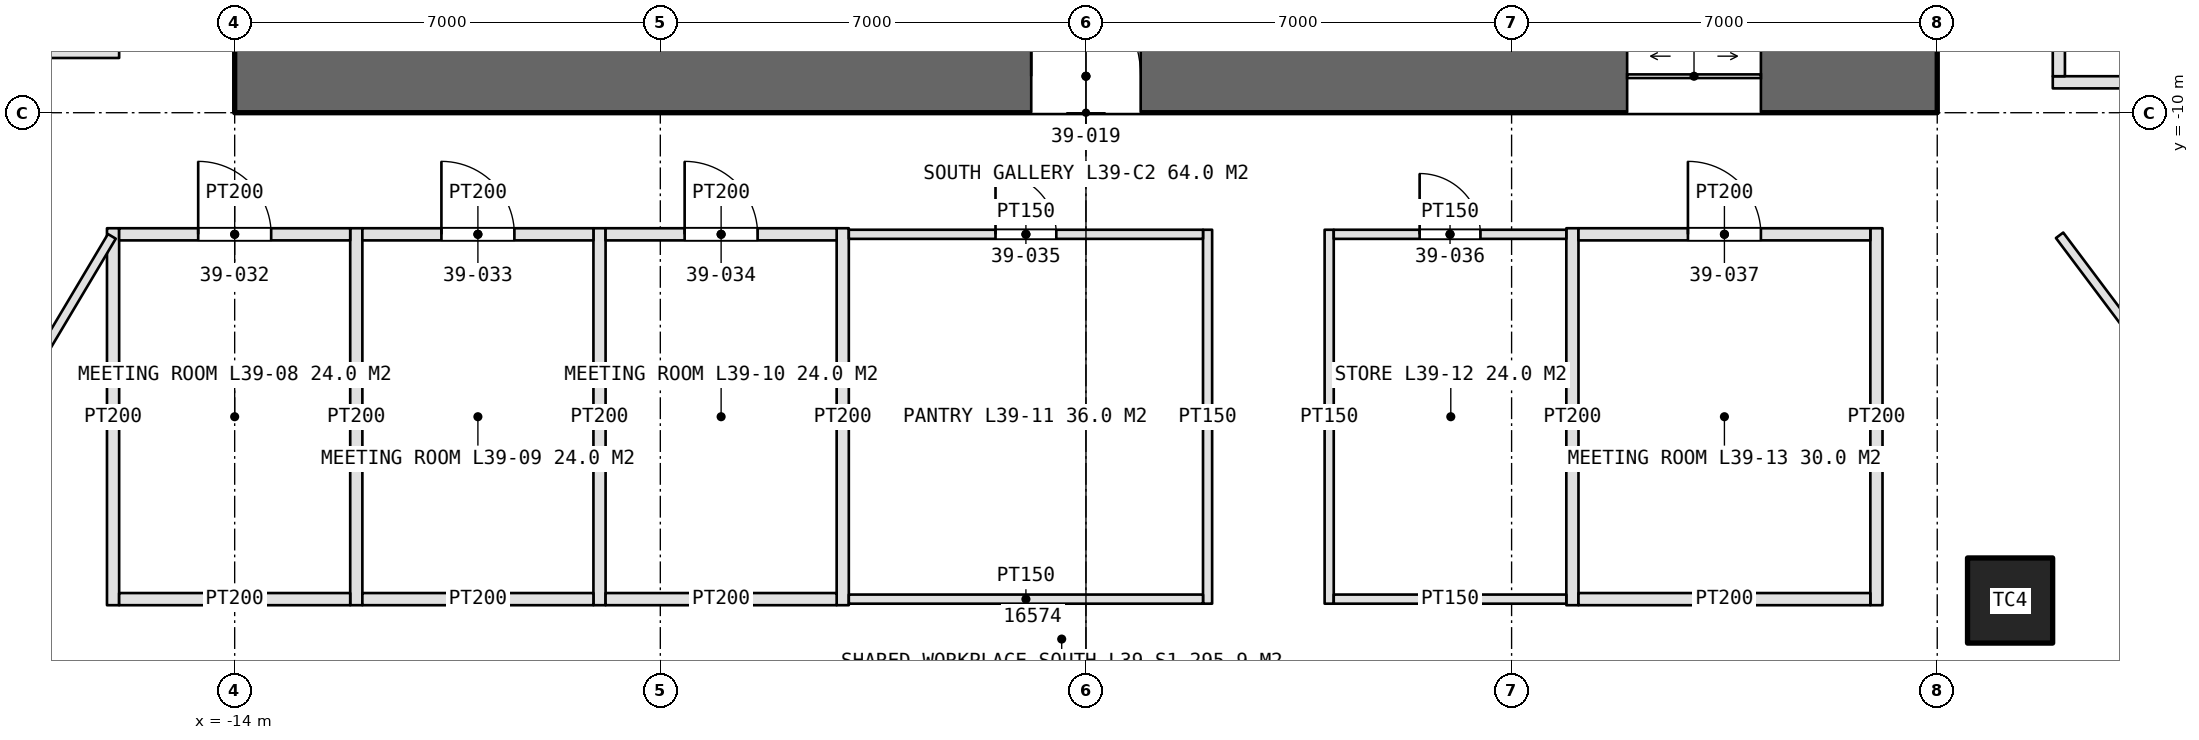
"""IFC4 building model, lengths in metres.
Left out: names, types, materials, properties, quantities, classifications, styles, units other than length and angle.
Written with IfcOpenShell. Run it as: python <this file> out.ifc"""

import sys

from ifc_helpers import new_model, si_unit, direction, frame, frame_2d, origin, origin_2d, place, context, subcontext, project, spatial, rectangle, extrude, element, fill, save


model = new_model("IFC4")
c1 = context("Model", 3, precision=1e-05, world=origin(), true_north=direction((0.0, 1.0)))
c2 = subcontext(c1, "Body", "Model", "MODEL_VIEW")
j1 = project(units=[si_unit("LENGTHUNIT", "METRE"), si_unit("PLANEANGLEUNIT", "RADIAN")], contexts=[c1])
p1 = place(None, origin())
s1 = spatial("IfcSite", under=j1, at=p1, CompositionType="ELEMENT")
p2 = place(p1, origin())
s2 = spatial("IfcBuilding", under=s1, at=p2, CompositionType="ELEMENT")
p3 = place(p2, frame((0.0, 0.0, 180.6)))
s3 = spatial("IfcBuildingStorey", under=s2, at=p3, CompositionType="ELEMENT", Elevation=180.6)
p4 = place(p3, frame((-14.0, -9.4, 0.0), z_axis=(0.0, 0.0, 1.0), x_axis=(1.0, 0.0, 0.0)))
e1 = element("IfcWall", 1, at=p4, inside=s3, PredefinedType="SHEAR", context=c2, shape_type="SweptSolid", body=[
    extrude(rectangle(XDim=28.0, YDim=1.2, at=frame_2d((14.0, 0.0))), origin(), (0.0, 0.0, 1.0), 4.2),
])
p5 = place(p4, frame((13.1, 0.0, 0.0)))
e2 = element("IfcOpeningElement", 2, at=p5, cuts=e1, PredefinedType="OPENING", context=c2, shape_type="SweptSolid", body=[
    extrude(rectangle(XDim=1.8, YDim=2.4, at=frame_2d((0.9, 1.2))), frame((0.0, 0.61, 0.0), z_axis=(0.0, -1.0, 0.0), x_axis=(1.0, 0.0, 0.0)), (0.0, 0.0, 1.0), 1.22),
])
p6 = place(p4, frame((22.9, 0.0, 0.0)))
e3 = element("IfcOpeningElement", 3, at=p6, cuts=e1, PredefinedType="OPENING", context=c2, shape_type="SweptSolid", body=[
    extrude(rectangle(XDim=2.2, YDim=2.7, at=frame_2d((1.1, 1.35))), frame((0.0, 0.61, 0.0), z_axis=(0.0, -1.0, 0.0), x_axis=(1.0, 0.0, 0.0)), (0.0, 0.0, 1.0), 1.22),
])
p7 = place(p3, frame((15.198, -18.023, 0.0), z_axis=(0.0, 0.0, 1.0), x_axis=(1.0, 0.0, 0.0)))
e4 = element("IfcColumn", 4, at=p7, inside=s3, PredefinedType="COLUMN", context=c2, shape_type="SweptSolid", body=[
    extrude(rectangle(XDim=1.4, YDim=1.4, at=origin_2d()), origin(), (0.0, 0.0, 1.0), 4.2),
])
p8 = place(p3, frame((15.9, -9.5, 0.0), z_axis=(0.0, 0.0, 1.0), x_axis=(1.0, 0.0, 0.0)))
e5 = element("IfcWall", 5, at=p8, inside=s3, PredefinedType="PARTITIONING", context=c2, shape_type="SweptSolid", body=[
    extrude(rectangle(XDim=7.2, YDim=0.2, at=frame_2d((3.6, 0.0))), origin(), (0.0, 0.0, 1.0), 3.0),
])
p9 = place(p3, frame((16.0, -9.4, 0.0), z_axis=(0.0, 0.0, 1.0), x_axis=(0.0, 1.0, 0.0)))
e6 = element("IfcWall", 6, at=p9, inside=s3, PredefinedType="PARTITIONING", context=c2, shape_type="SweptSolid", body=[
    extrude(rectangle(XDim=5.8, YDim=0.2, at=frame_2d((2.9, 0.0))), origin(), (0.0, 0.0, 1.0), 3.0),
])
p10 = place(p9, frame((2.3, 0.0, 0.0)))
e7 = element("IfcOpeningElement", 7, at=p10, cuts=e6, PredefinedType="OPENING", context=c2, shape_type="SweptSolid", body=[
    extrude(rectangle(XDim=1.2, YDim=2.4, at=frame_2d((0.6, 1.2))), frame((0.0, 0.11, 0.0), z_axis=(0.0, -1.0, 0.0), x_axis=(1.0, 0.0, 0.0)), (0.0, 0.0, 1.0), 0.22),
])
for number, where, z_axis, x_axis in (
    (8, (-16.0, -11.9, 0.0), (0.0, 0.0, 1.0), (0.0, -1.0, 0.0)),
    (9, (-12.0, -11.9, 0.0), (0.0, 0.0, 1.0), (0.0, -1.0, 0.0)),
    (10, (-8.0, -11.9, 0.0), (0.0, 0.0, 1.0), (0.0, -1.0, 0.0)),
    (11, (-4.0, -11.9, 0.0), (0.0, 0.0, 1.0), (0.0, -1.0, 0.0)),
):
    element("IfcWall", number, at=place(p3, frame(where, z_axis=z_axis, x_axis=x_axis)), inside=s3, PredefinedType="PARTITIONING", context=c2, shape_type="SweptSolid", body=[
        extrude(rectangle(XDim=6.2, YDim=0.2, at=frame_2d((3.1, 0.0))), origin(), (0.0, 0.0, 1.0), 3.0),
    ])
p11 = place(p3, frame((2.0, -11.925, 0.0), z_axis=(0.0, 0.0, 1.0), x_axis=(0.0, -1.0, 0.0)))
e12 = element("IfcWall", 12, at=p11, inside=s3, PredefinedType="PARTITIONING", context=c2, shape_type="SweptSolid", body=[
    extrude(rectangle(XDim=6.15, YDim=0.15, at=frame_2d((3.075, 0.0))), origin(), (0.0, 0.0, 1.0), 3.0),
])
p12 = place(p3, frame((-15.9, -12.0, 0.0), z_axis=(0.0, 0.0, 1.0), x_axis=(1.0, 0.0, 0.0)))
e13 = element("IfcWall", 13, at=p12, inside=s3, PredefinedType="PARTITIONING", context=c2, shape_type="SweptSolid", body=[
    extrude(rectangle(XDim=3.8, YDim=0.2, at=frame_2d((1.9, 0.0))), origin(), (0.0, 0.0, 1.0), 3.0),
])
p13 = place(p12, frame((1.3, 0.0, 0.0)))
e14 = element("IfcOpeningElement", 14, at=p13, cuts=e13, PredefinedType="OPENING", context=c2, shape_type="SweptSolid", body=[
    extrude(rectangle(XDim=1.2, YDim=2.4, at=frame_2d((0.6, 1.2))), frame((0.0, 0.11, 0.0), z_axis=(0.0, -1.0, 0.0), x_axis=(1.0, 0.0, 0.0)), (0.0, 0.0, 1.0), 0.22),
])
p14 = place(p3, frame((-15.9, -18.0, 0.0), z_axis=(0.0, 0.0, 1.0), x_axis=(1.0, 0.0, 0.0)))
e15 = element("IfcWall", 15, at=p14, inside=s3, PredefinedType="PARTITIONING", context=c2, shape_type="SweptSolid", body=[
    extrude(rectangle(XDim=3.8, YDim=0.2, at=frame_2d((1.9, 0.0))), origin(), (0.0, 0.0, 1.0), 3.0),
])
p15 = place(p3, frame((-11.9, -12.0, 0.0), z_axis=(0.0, 0.0, 1.0), x_axis=(1.0, 0.0, 0.0)))
e16 = element("IfcWall", 16, at=p15, inside=s3, PredefinedType="PARTITIONING", context=c2, shape_type="SweptSolid", body=[
    extrude(rectangle(XDim=3.8, YDim=0.2, at=frame_2d((1.9, 0.0))), origin(), (0.0, 0.0, 1.0), 3.0),
])
p16 = place(p15, frame((1.3, 0.0, 0.0)))
e17 = element("IfcOpeningElement", 17, at=p16, cuts=e16, PredefinedType="OPENING", context=c2, shape_type="SweptSolid", body=[
    extrude(rectangle(XDim=1.2, YDim=2.4, at=frame_2d((0.6, 1.2))), frame((0.0, 0.11, 0.0), z_axis=(0.0, -1.0, 0.0), x_axis=(1.0, 0.0, 0.0)), (0.0, 0.0, 1.0), 0.22),
])
p17 = place(p3, frame((-11.9, -18.0, 0.0), z_axis=(0.0, 0.0, 1.0), x_axis=(1.0, 0.0, 0.0)))
e18 = element("IfcWall", 18, at=p17, inside=s3, PredefinedType="PARTITIONING", context=c2, shape_type="SweptSolid", body=[
    extrude(rectangle(XDim=3.8, YDim=0.2, at=frame_2d((1.9, 0.0))), origin(), (0.0, 0.0, 1.0), 3.0),
])
p18 = place(p3, frame((-7.9, -12.0, 0.0), z_axis=(0.0, 0.0, 1.0), x_axis=(1.0, 0.0, 0.0)))
e19 = element("IfcWall", 19, at=p18, inside=s3, PredefinedType="PARTITIONING", context=c2, shape_type="SweptSolid", body=[
    extrude(rectangle(XDim=3.8, YDim=0.2, at=frame_2d((1.9, 0.0))), origin(), (0.0, 0.0, 1.0), 3.0),
])
p19 = place(p18, frame((1.3, 0.0, 0.0)))
e20 = element("IfcOpeningElement", 20, at=p19, cuts=e19, PredefinedType="OPENING", context=c2, shape_type="SweptSolid", body=[
    extrude(rectangle(XDim=1.2, YDim=2.4, at=frame_2d((0.6, 1.2))), frame((0.0, 0.11, 0.0), z_axis=(0.0, -1.0, 0.0), x_axis=(1.0, 0.0, 0.0)), (0.0, 0.0, 1.0), 0.22),
])
p20 = place(p3, frame((-7.9, -18.0, 0.0), z_axis=(0.0, 0.0, 1.0), x_axis=(1.0, 0.0, 0.0)))
e21 = element("IfcWall", 21, at=p20, inside=s3, PredefinedType="PARTITIONING", context=c2, shape_type="SweptSolid", body=[
    extrude(rectangle(XDim=3.8, YDim=0.2, at=frame_2d((1.9, 0.0))), origin(), (0.0, 0.0, 1.0), 3.0),
])
p21 = place(p3, frame((-3.9, -12.0, 0.0), z_axis=(0.0, 0.0, 1.0), x_axis=(1.0, 0.0, 0.0)))
e22 = element("IfcWall", 22, at=p21, inside=s3, PredefinedType="PARTITIONING", context=c2, shape_type="SweptSolid", body=[
    extrude(rectangle(XDim=5.825, YDim=0.15, at=frame_2d((2.913, 0.0))), origin(), (0.0, 0.0, 1.0), 3.0),
])
p22 = place(p21, frame((2.413, 0.0, 0.0)))
e23 = element("IfcOpeningElement", 23, at=p22, cuts=e22, PredefinedType="OPENING", context=c2, shape_type="SweptSolid", body=[
    extrude(rectangle(XDim=1.0, YDim=2.2, at=frame_2d((0.5, 1.1))), frame((0.0, 0.085, 0.0), z_axis=(0.0, -1.0, 0.0), x_axis=(1.0, 0.0, 0.0)), (0.0, 0.0, 1.0), 0.17),
])
p23 = place(p3, frame((-3.9, -18.0, 0.0), z_axis=(0.0, 0.0, 1.0), x_axis=(1.0, 0.0, 0.0)))
e24 = element("IfcWall", 24, at=p23, inside=s3, PredefinedType="PARTITIONING", context=c2, shape_type="SweptSolid", body=[
    extrude(rectangle(XDim=5.825, YDim=0.15, at=frame_2d((2.913, 0.0))), origin(), (0.0, 0.0, 1.0), 3.0),
])
p24 = place(p3, frame((4.0, -11.925, 0.0), z_axis=(0.0, 0.0, 1.0), x_axis=(0.0, -1.0, 0.0)))
e25 = element("IfcWall", 25, at=p24, inside=s3, PredefinedType="PARTITIONING", context=c2, shape_type="SweptSolid", body=[
    extrude(rectangle(XDim=6.15, YDim=0.15, at=frame_2d((3.075, 0.0))), origin(), (0.0, 0.0, 1.0), 3.0),
])
for number, where, z_axis, x_axis in (
    (26, (8.0, -11.9, 0.0), (0.0, 0.0, 1.0), (0.0, -1.0, 0.0)),
    (27, (13.0, -11.9, 0.0), (0.0, 0.0, 1.0), (0.0, -1.0, 0.0)),
):
    element("IfcWall", number, at=place(p3, frame(where, z_axis=z_axis, x_axis=x_axis)), inside=s3, PredefinedType="PARTITIONING", context=c2, shape_type="SweptSolid", body=[
        extrude(rectangle(XDim=6.2, YDim=0.2, at=frame_2d((3.1, 0.0))), origin(), (0.0, 0.0, 1.0), 3.0),
    ])
p25 = place(p3, frame((4.075, -12.0, 0.0), z_axis=(0.0, 0.0, 1.0), x_axis=(1.0, 0.0, 0.0)))
e28 = element("IfcWall", 28, at=p25, inside=s3, PredefinedType="PARTITIONING", context=c2, shape_type="SweptSolid", body=[
    extrude(rectangle(XDim=3.825, YDim=0.15, at=frame_2d((1.913, 0.0))), origin(), (0.0, 0.0, 1.0), 3.0),
])
p26 = place(p25, frame((1.413, 0.0, 0.0)))
e29 = element("IfcOpeningElement", 29, at=p26, cuts=e28, PredefinedType="OPENING", context=c2, shape_type="SweptSolid", body=[
    extrude(rectangle(XDim=1.0, YDim=2.2, at=frame_2d((0.5, 1.1))), frame((0.0, 0.085, 0.0), z_axis=(0.0, -1.0, 0.0), x_axis=(1.0, 0.0, 0.0)), (0.0, 0.0, 1.0), 0.17),
])
p27 = place(p3, frame((4.075, -18.0, 0.0), z_axis=(0.0, 0.0, 1.0), x_axis=(1.0, 0.0, 0.0)))
e30 = element("IfcWall", 30, at=p27, inside=s3, PredefinedType="PARTITIONING", context=c2, shape_type="SweptSolid", body=[
    extrude(rectangle(XDim=3.825, YDim=0.15, at=frame_2d((1.913, 0.0))), origin(), (0.0, 0.0, 1.0), 3.0),
])
p28 = place(p3, frame((8.1, -12.0, 0.0), z_axis=(0.0, 0.0, 1.0), x_axis=(1.0, 0.0, 0.0)))
e31 = element("IfcWall", 31, at=p28, inside=s3, PredefinedType="PARTITIONING", context=c2, shape_type="SweptSolid", body=[
    extrude(rectangle(XDim=4.8, YDim=0.2, at=frame_2d((2.4, 0.0))), origin(), (0.0, 0.0, 1.0), 3.0),
])
p29 = place(p28, frame((1.8, 0.0, 0.0)))
e32 = element("IfcOpeningElement", 32, at=p29, cuts=e31, PredefinedType="OPENING", context=c2, shape_type="SweptSolid", body=[
    extrude(rectangle(XDim=1.2, YDim=2.4, at=frame_2d((0.6, 1.2))), frame((0.0, 0.11, 0.0), z_axis=(0.0, -1.0, 0.0), x_axis=(1.0, 0.0, 0.0)), (0.0, 0.0, 1.0), 0.22),
])
p30 = place(p3, frame((8.1, -18.0, 0.0), z_axis=(0.0, 0.0, 1.0), x_axis=(1.0, 0.0, 0.0)))
e33 = element("IfcWall", 33, at=p30, inside=s3, PredefinedType="PARTITIONING", context=c2, shape_type="SweptSolid", body=[
    extrude(rectangle(XDim=4.8, YDim=0.2, at=frame_2d((2.4, 0.0))), origin(), (0.0, 0.0, 1.0), 3.0),
])
p31 = place(p3, frame((-15.9, -9.0, 0.0), z_axis=(0.0, 0.0, 1.0), x_axis=(-1.0, 0.0, 0.0)))
e34 = element("IfcWall", 34, at=p31, inside=s3, PredefinedType="PARTITIONING", context=c2, shape_type="SweptSolid", body=[
    extrude(rectangle(XDim=6.2, YDim=0.2, at=frame_2d((3.1, 0.0))), origin(), (0.0, 0.0, 1.0), 3.0),
])
p32 = place(p3, frame((-16.02, -12.034, 0.0), z_axis=(0.0, 0.0, 1.0), x_axis=(-0.511518902153, -0.859272024879, 0.0)))
e35 = element("IfcWall", 35, at=p32, inside=s3, PredefinedType="PARTITIONING", context=c2, shape_type="SweptSolid", body=[
    extrude(rectangle(XDim=8.451, YDim=0.15, at=frame_2d((4.226, 0.0))), origin(), (0.0, 0.0, 1.0), 3.0),
])
p33 = place(p3, frame((16.012, -12.016, 0.0), z_axis=(0.0, 0.0, 1.0), x_axis=(0.600059749679, -0.799955184254, 0.0)))
e36 = element("IfcWall", 36, at=p33, inside=s3, PredefinedType="PARTITIONING", context=c2, shape_type="SweptSolid", body=[
    extrude(rectangle(XDim=7.191, YDim=0.15, at=frame_2d((3.596, 0.0))), origin(), (0.0, 0.0, 1.0), 3.0),
])
p34 = place(p5, origin())
e37 = element("IfcDoor", 37, at=p34, inside=s3, OperationType="DOUBLE_DOOR_SINGLE_SWING", PredefinedType="DOOR", context=c2, shape_type="SweptSolid", body=[
    extrude(rectangle(XDim=1.8, YDim=2.4, at=frame_2d((0.9, 1.2))), frame((0.0, 0.025, 0.0), z_axis=(0.0, -1.0, 0.0), x_axis=(1.0, 0.0, 0.0)), (0.0, 0.0, 1.0), 0.05),
])
fill(e2, e37)
p35 = place(p6, origin())
e38 = element("IfcDoor", 38, at=p35, inside=s3, OperationType="DOUBLE_DOOR_SLIDING", PredefinedType="DOOR", context=c2, shape_type="SweptSolid", body=[
    extrude(rectangle(XDim=2.2, YDim=2.7, at=frame_2d((1.1, 1.35))), frame((0.0, 0.025, 0.0), z_axis=(0.0, -1.0, 0.0), x_axis=(1.0, 0.0, 0.0)), (0.0, 0.0, 1.0), 0.05),
])
fill(e3, e38)
p36 = place(p13, origin())
e39 = element("IfcDoor", 39, at=p36, inside=s3, OperationType="SINGLE_SWING_LEFT", PredefinedType="DOOR", context=c2, shape_type="SweptSolid", body=[
    extrude(rectangle(XDim=1.2, YDim=2.4, at=frame_2d((0.6, 1.2))), frame((0.0, 0.025, 0.0), z_axis=(0.0, -1.0, 0.0), x_axis=(1.0, 0.0, 0.0)), (0.0, 0.0, 1.0), 0.05),
])
fill(e14, e39)
p37 = place(p16, origin())
e40 = element("IfcDoor", 40, at=p37, inside=s3, OperationType="SINGLE_SWING_LEFT", PredefinedType="DOOR", context=c2, shape_type="SweptSolid", body=[
    extrude(rectangle(XDim=1.2, YDim=2.4, at=frame_2d((0.6, 1.2))), frame((0.0, 0.025, 0.0), z_axis=(0.0, -1.0, 0.0), x_axis=(1.0, 0.0, 0.0)), (0.0, 0.0, 1.0), 0.05),
])
fill(e17, e40)
p38 = place(p19, origin())
e41 = element("IfcDoor", 41, at=p38, inside=s3, OperationType="SINGLE_SWING_LEFT", PredefinedType="DOOR", context=c2, shape_type="SweptSolid", body=[
    extrude(rectangle(XDim=1.2, YDim=2.4, at=frame_2d((0.6, 1.2))), frame((0.0, 0.025, 0.0), z_axis=(0.0, -1.0, 0.0), x_axis=(1.0, 0.0, 0.0)), (0.0, 0.0, 1.0), 0.05),
])
fill(e20, e41)
p39 = place(p22, origin())
e42 = element("IfcDoor", 42, at=p39, inside=s3, OperationType="SINGLE_SWING_LEFT", PredefinedType="DOOR", context=c2, shape_type="SweptSolid", body=[
    extrude(rectangle(XDim=1.0, YDim=2.2, at=frame_2d((0.5, 1.1))), frame((0.0, 0.025, 0.0), z_axis=(0.0, -1.0, 0.0), x_axis=(1.0, 0.0, 0.0)), (0.0, 0.0, 1.0), 0.05),
])
fill(e23, e42)
p40 = place(p26, origin())
e43 = element("IfcDoor", 43, at=p40, inside=s3, OperationType="SINGLE_SWING_LEFT", PredefinedType="DOOR", context=c2, shape_type="SweptSolid", body=[
    extrude(rectangle(XDim=1.0, YDim=2.2, at=frame_2d((0.5, 1.1))), frame((0.0, 0.025, 0.0), z_axis=(0.0, -1.0, 0.0), x_axis=(1.0, 0.0, 0.0)), (0.0, 0.0, 1.0), 0.05),
])
fill(e29, e43)
p41 = place(p29, origin())
e44 = element("IfcDoor", 44, at=p41, inside=s3, OperationType="SINGLE_SWING_LEFT", PredefinedType="DOOR", context=c2, shape_type="SweptSolid", body=[
    extrude(rectangle(XDim=1.2, YDim=2.4, at=frame_2d((0.6, 1.2))), frame((0.0, 0.025, 0.0), z_axis=(0.0, -1.0, 0.0), x_axis=(1.0, 0.0, 0.0)), (0.0, 0.0, 1.0), 0.05),
])
fill(e32, e44)
save(model, sys.argv[1])
